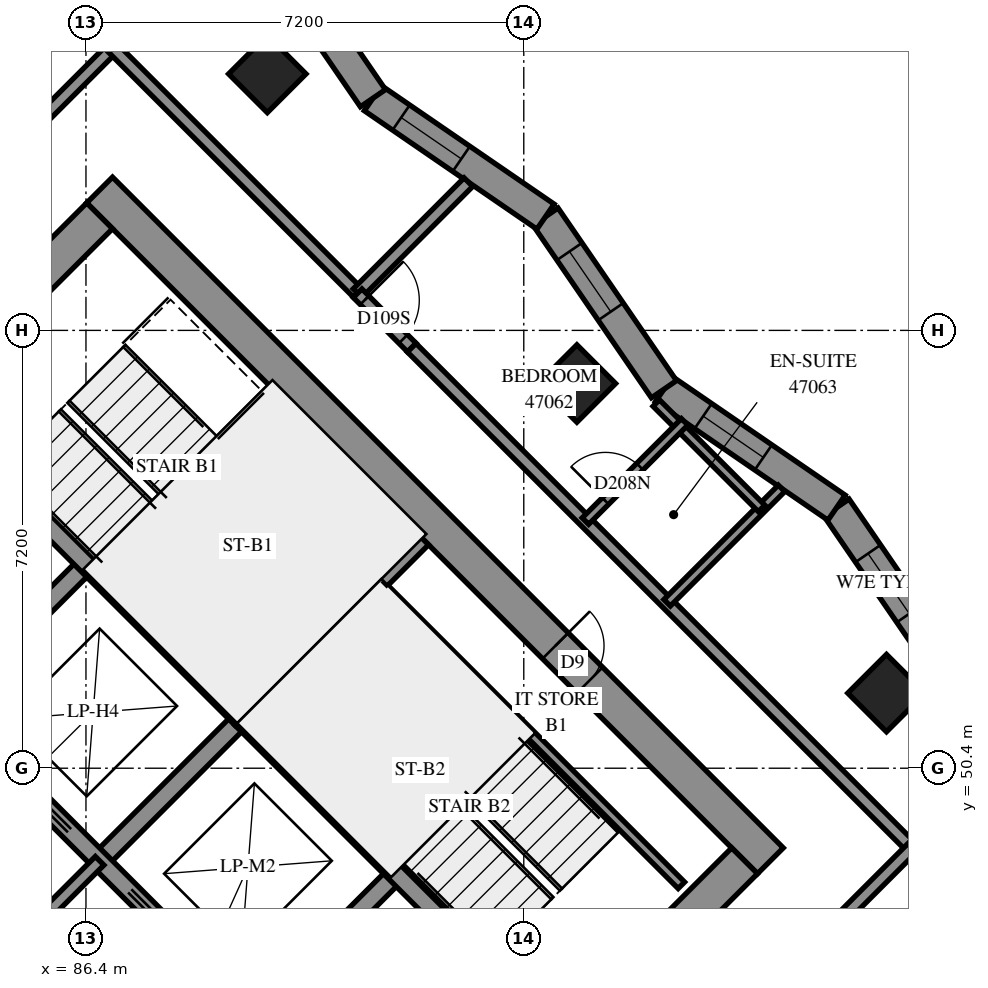
"""IFC4 building model, lengths in metres.
Left out: names, types, materials, properties, quantities, classifications, styles, units other than length and angle.
Written with IfcOpenShell. Run it as: python <this file> out.ifc"""

import sys

from ifc_helpers import new_model, si_unit, direction, frame, frame_2d, origin, origin_2d, place, context, subcontext, project, spatial, polyline, rectangle, outline, extrude, element, fill, save


model = new_model("IFC4")
c1 = context("Model", 3, precision=1e-05, world=origin(), true_north=direction((0.0, 1.0)))
c2 = subcontext(c1, "Body", "Model", "MODEL_VIEW")
j1 = project(units=[si_unit("LENGTHUNIT", "METRE"), si_unit("PLANEANGLEUNIT", "RADIAN")], contexts=[c1])
p1 = place(None, origin())
s1 = spatial("IfcSite", under=j1, at=p1, CompositionType="ELEMENT")
p2 = place(p1, origin())
s2 = spatial("IfcBuilding", under=s1, at=p2, CompositionType="ELEMENT")
p3 = place(p2, frame((0.0, 0.0, 172.8)))
s3 = spatial("IfcBuildingStorey", under=s2, at=p3, CompositionType="ELEMENT", Elevation=172.8)
for number, where, z_axis, x_axis in (
    (1, (89.382, 61.818, 0.0), (0.0, 0.0, 1.0), (0.707, -0.707, 0.0)),
    (2, (94.474, 56.727, 0.0), (0.0, 0.0, 1.0), (0.707, -0.707, 0.0)),
    (3, (99.565, 51.635, 0.0), (0.0, 0.0, 1.0), (0.707, -0.707, 0.0)),
):
    element("IfcColumn", number, at=place(p3, frame(where, z_axis=z_axis, x_axis=x_axis)), inside=s3, PredefinedType="COLUMN", context=c2, shape_type="SweptSolid", body=[
        extrude(rectangle(XDim=0.9, YDim=0.9, at=origin_2d()), origin(), (0.0, 0.0, 1.0), 3.1),
    ])
p4 = place(p3, frame((76.018, 49.302, -0.3), z_axis=(0.0, 0.0, 1.0), x_axis=(0.7071067812, -0.7071067812, 0.0)))
e4 = element("IfcWall", 4, at=p4, inside=s3, PredefinedType="SHEAR", context=c2, shape_type="SweptSolid", body=[
    extrude(rectangle(XDim=15.6, YDim=0.6, at=frame_2d((7.8, 0.0))), origin(), (0.0, 0.0, 1.0), 2.7),
])
p5 = place(p3, frame((86.625, 59.908, -0.3), z_axis=(0.0, 0.0, 1.0), x_axis=(0.7071067812, -0.7071067812, 0.0)))
e5 = element("IfcWall", 5, at=p5, inside=s3, PredefinedType="SHEAR", context=c2, shape_type="SweptSolid", body=[
    extrude(rectangle(XDim=15.6, YDim=0.6, at=frame_2d((7.8, 0.0))), origin(), (0.0, 0.0, 1.0), 2.7),
])
p6 = place(p5, frame((10.6, 0.0, 0.3)))
e6 = element("IfcOpeningElement", 6, at=p6, cuts=e5, PredefinedType="OPENING", context=c2, shape_type="SweptSolid", body=[
    extrude(rectangle(XDim=0.8, YDim=2.1, at=frame_2d((0.4, 1.05))), frame((0.0, 0.31, 0.0), z_axis=(0.0, -1.0, 0.0), x_axis=(1.0, 0.0, 0.0)), (0.0, 0.0, 1.0), 0.62),
])
p7 = place(p3, frame((76.442, 49.302, -0.3), z_axis=(0.0, 0.0, 1.0), x_axis=(0.7071067812, 0.7071067812, 0.0)))
e7 = element("IfcWall", 7, at=p7, inside=s3, PredefinedType="SHEAR", context=c2, shape_type="SweptSolid", body=[
    extrude(rectangle(XDim=14.4, YDim=0.6, at=frame_2d((7.2, 0.0))), origin(), (0.0, 0.0, 1.0), 2.7),
])
p8 = place(p7, frame((4.55, 0.0, 0.3)))
e8 = element("IfcOpeningElement", 8, at=p8, cuts=e7, PredefinedType="OPENING", context=c2, shape_type="SweptSolid", body=[
    extrude(rectangle(XDim=1.1, YDim=2.1, at=frame_2d((0.55, 1.05))), frame((0.0, 0.31, 0.0), z_axis=(0.0, -1.0, 0.0), x_axis=(1.0, 0.0, 0.0)), (0.0, 0.0, 1.0), 0.62),
])
p9 = place(p7, frame((11.35, 0.0, 0.3)))
e9 = element("IfcOpeningElement", 9, at=p9, cuts=e7, PredefinedType="OPENING", context=c2, shape_type="SweptSolid", body=[
    extrude(rectangle(XDim=1.1, YDim=2.1, at=frame_2d((0.55, 1.05))), frame((0.0, 0.31, 0.0), z_axis=(0.0, -1.0, 0.0), x_axis=(1.0, 0.0, 0.0)), (0.0, 0.0, 1.0), 0.62),
])
p10 = place(p3, frame((87.049, 38.695, -0.3), z_axis=(0.0, 0.0, 1.0), x_axis=(0.7071067812, 0.7071067812, 0.0)))
e10 = element("IfcWall", 10, at=p10, inside=s3, PredefinedType="SHEAR", context=c2, shape_type="SweptSolid", body=[
    extrude(rectangle(XDim=14.4, YDim=0.6, at=frame_2d((7.2, 0.0))), origin(), (0.0, 0.0, 1.0), 2.7),
])
p11 = place(p10, frame((4.55, 0.0, 0.3)))
e11 = element("IfcOpeningElement", 11, at=p11, cuts=e10, PredefinedType="OPENING", context=c2, shape_type="SweptSolid", body=[
    extrude(rectangle(XDim=1.1, YDim=2.1, at=frame_2d((0.55, 1.05))), frame((0.0, 0.31, 0.0), z_axis=(0.0, -1.0, 0.0), x_axis=(1.0, 0.0, 0.0)), (0.0, 0.0, 1.0), 0.62),
])
p12 = place(p10, frame((11.35, 0.0, 0.3)))
e12 = element("IfcOpeningElement", 12, at=p12, cuts=e10, PredefinedType="OPENING", context=c2, shape_type="SweptSolid", body=[
    extrude(rectangle(XDim=1.1, YDim=2.1, at=frame_2d((0.55, 1.05))), frame((0.0, 0.31, 0.0), z_axis=(0.0, -1.0, 0.0), x_axis=(1.0, 0.0, 0.0)), (0.0, 0.0, 1.0), 0.62),
])
p13 = place(p3, frame((84.079, 51.423, 0.0), z_axis=(0.0, 0.0, 1.0), x_axis=(0.7071219326, 0.7070916295, 0.0)))
e13 = element("IfcWall", 13, at=p13, inside=s3, PredefinedType="SOLIDWALL", context=c2, shape_type="SweptSolid", body=[
    extrude(rectangle(XDim=3.3, YDim=0.3, at=frame_2d((1.65, 0.0))), origin(), (0.0, 0.0, 1.0), 3.1),
])
for number, where, z_axis, x_axis in (
    (14, (86.625, 48.878, 0.0), (0.0, 0.0, 1.0), (0.707, 0.707, 0.0)),
    (15, (89.17, 46.332, 0.0), (0.0, 0.0, 1.0), (0.707, 0.707, 0.0)),
):
    element("IfcWall", number, at=place(p3, frame(where, z_axis=z_axis, x_axis=x_axis)), inside=s3, PredefinedType="SOLIDWALL", context=c2, shape_type="SweptSolid", body=[
        extrude(rectangle(XDim=3.3, YDim=0.3, at=frame_2d((1.65, 0.0))), origin(), (0.0, 0.0, 1.0), 3.1),
    ])
p14 = place(p3, frame((78.988, 51.423, 0.0), z_axis=(0.0, 0.0, 1.0), x_axis=(0.7071067812, -0.7071067812, 0.0)))
e16 = element("IfcWall", 16, at=p14, inside=s3, PredefinedType="SOLIDWALL", context=c2, shape_type="SweptSolid", body=[
    extrude(rectangle(XDim=14.4, YDim=0.3, at=frame_2d((7.2, 0.0))), origin(), (0.0, 0.0, 1.0), 3.1),
])
p15 = place(p14, frame((1.35, 0.0, 0.0)))
e17 = element("IfcOpeningElement", 17, at=p15, cuts=e16, PredefinedType="OPENING", context=c2, shape_type="SweptSolid", body=[
    extrude(rectangle(XDim=0.9, YDim=2.1, at=frame_2d((0.45, 1.05))), frame((0.0, 0.16, 0.0), z_axis=(0.0, -1.0, 0.0), x_axis=(1.0, 0.0, 0.0)), (0.0, 0.0, 1.0), 0.32),
])
p16 = place(p14, frame((4.95, 0.0, 0.0)))
e18 = element("IfcOpeningElement", 18, at=p16, cuts=e16, PredefinedType="OPENING", context=c2, shape_type="SweptSolid", body=[
    extrude(rectangle(XDim=0.9, YDim=2.1, at=frame_2d((0.45, 1.05))), frame((0.0, 0.16, 0.0), z_axis=(0.0, -1.0, 0.0), x_axis=(1.0, 0.0, 0.0)), (0.0, 0.0, 1.0), 0.32),
])
p17 = place(p14, frame((8.55, 0.0, 0.0)))
e19 = element("IfcOpeningElement", 19, at=p17, cuts=e16, PredefinedType="OPENING", context=c2, shape_type="SweptSolid", body=[
    extrude(rectangle(XDim=0.9, YDim=2.1, at=frame_2d((0.45, 1.05))), frame((0.0, 0.16, 0.0), z_axis=(0.0, -1.0, 0.0), x_axis=(1.0, 0.0, 0.0)), (0.0, 0.0, 1.0), 0.32),
])
p18 = place(p14, frame((12.05, 0.0, 0.0)))
e20 = element("IfcOpeningElement", 20, at=p18, cuts=e16, PredefinedType="OPENING", context=c2, shape_type="SweptSolid", body=[
    extrude(rectangle(XDim=1.1, YDim=2.1, at=frame_2d((0.55, 1.05))), frame((0.0, 0.16, 0.0), z_axis=(0.0, -1.0, 0.0), x_axis=(1.0, 0.0, 0.0)), (0.0, 0.0, 1.0), 0.32),
])
p19 = place(p3, frame((81.534, 53.969, 0.0), z_axis=(0.0, 0.0, 1.0), x_axis=(0.707103309, -0.7071102534, 0.0)))
e21 = element("IfcWall", 21, at=p19, inside=s3, PredefinedType="SOLIDWALL", context=c2, shape_type="SweptSolid", body=[
    extrude(rectangle(XDim=14.4, YDim=0.3, at=frame_2d((7.2, 0.0))), origin(), (0.0, 0.0, 1.0), 3.1),
])
p20 = place(p19, frame((1.25, 0.0, 0.0)))
e22 = element("IfcOpeningElement", 22, at=p20, cuts=e21, PredefinedType="OPENING", context=c2, shape_type="SweptSolid", body=[
    extrude(rectangle(XDim=1.1, YDim=2.1, at=frame_2d((0.55, 1.05))), frame((0.0, 0.16, 0.0), z_axis=(0.0, -1.0, 0.0), x_axis=(1.0, 0.0, 0.0)), (0.0, 0.0, 1.0), 0.32),
])
p21 = place(p19, frame((4.85, 0.0, 0.0)))
e23 = element("IfcOpeningElement", 23, at=p21, cuts=e21, PredefinedType="OPENING", context=c2, shape_type="SweptSolid", body=[
    extrude(rectangle(XDim=1.1, YDim=2.1, at=frame_2d((0.55, 1.05))), frame((0.0, 0.16, 0.0), z_axis=(0.0, -1.0, 0.0), x_axis=(1.0, 0.0, 0.0)), (0.0, 0.0, 1.0), 0.32),
])
p22 = place(p19, frame((8.45, 0.0, 0.0)))
e24 = element("IfcOpeningElement", 24, at=p22, cuts=e21, PredefinedType="OPENING", context=c2, shape_type="SweptSolid", body=[
    extrude(rectangle(XDim=1.1, YDim=2.1, at=frame_2d((0.55, 1.05))), frame((0.0, 0.16, 0.0), z_axis=(0.0, -1.0, 0.0), x_axis=(1.0, 0.0, 0.0)), (0.0, 0.0, 1.0), 0.32),
])
p23 = place(p19, frame((12.05, 0.0, 0.0)))
e25 = element("IfcOpeningElement", 25, at=p23, cuts=e21, PredefinedType="OPENING", context=c2, shape_type="SweptSolid", body=[
    extrude(rectangle(XDim=1.1, YDim=2.1, at=frame_2d((0.55, 1.05))), frame((0.0, 0.16, 0.0), z_axis=(0.0, -1.0, 0.0), x_axis=(1.0, 0.0, 0.0)), (0.0, 0.0, 1.0), 0.32),
])
for number, where, z_axis, x_axis in (
    (26, (83.867, 56.302, 0.0), (0.0, 0.0, 1.0), (0.707, -0.707, 0.0)),
    (27, (88.958, 51.211, 0.0), (0.0, 0.0, 1.0), (0.707, -0.707, 0.0)),
):
    element("IfcWall", number, at=place(p3, frame(where, z_axis=z_axis, x_axis=x_axis)), inside=s3, PredefinedType="SOLIDWALL", context=c2, shape_type="SweptSolid", body=[
        extrude(rectangle(XDim=7.2, YDim=0.3, at=frame_2d((3.6, 0.0))), origin(), (0.0, 0.0, 1.0), 3.1),
    ])
p24 = place(p3, frame((88.958, 51.211, 0.0), z_axis=(0.0, 0.0, 1.0), x_axis=(0.7071067812, 0.7071067812, 0.0)))
e28 = element("IfcWall", 28, at=p24, inside=s3, PredefinedType="SOLIDWALL", context=c2, shape_type="SweptSolid", body=[
    extrude(rectangle(XDim=4.2, YDim=0.3, at=frame_2d((2.1, 0.0))), origin(), (0.0, 0.0, 1.0), 3.1),
])
p25 = place(p3, frame((100.691, 51.846, 0.0), z_axis=(0.0, 0.0, 1.0), x_axis=(-0.5657654369, 0.8245662316, 0.0)))
e29 = element("IfcWall", 29, at=p25, inside=s3, PredefinedType="SOLIDWALL", context=c2, shape_type="SweptSolid", body=[
    extrude(outline(polyline([(0.046, -0.25), (3.489, -0.25), (3.396, 0.25), (-0.046, 0.25), (0.046, -0.25)])), origin(), (0.0, 0.0, 1.0), 3.1),
])
p26 = place(p25, frame((1.327, 0.0, 0.45)))
e30 = element("IfcOpeningElement", 30, at=p26, cuts=e29, PredefinedType="OPENING", context=c2, shape_type="SweptSolid", body=[
    extrude(rectangle(XDim=1.2, YDim=2.5, at=frame_2d((0.6, 1.25))), frame((0.0, 0.26, 0.0), z_axis=(0.0, -1.0, 0.0), x_axis=(1.0, 0.0, 0.0)), (0.0, 0.0, 1.0), 0.52),
])
p27 = place(p3, frame((98.744, 54.685, 0.0), z_axis=(0.0, 0.0, 1.0), x_axis=(-0.8245797835, 0.5657456855, 0.0)))
e31 = element("IfcWall", 31, at=p27, inside=s3, PredefinedType="SOLIDWALL", context=c2, shape_type="SweptSolid", body=[
    extrude(outline(polyline([(-0.046, -0.25), (3.396, -0.25), (3.489, 0.25), (0.046, 0.25), (-0.046, -0.25)])), origin(), (0.0, 0.0, 1.0), 3.1),
])
p28 = place(p27, frame((1.46, 0.0, 0.45)))
e32 = element("IfcOpeningElement", 32, at=p28, cuts=e31, PredefinedType="OPENING", context=c2, shape_type="SweptSolid", body=[
    extrude(rectangle(XDim=1.2, YDim=2.5, at=frame_2d((0.6, 1.25))), frame((0.0, 0.26, 0.0), z_axis=(0.0, -1.0, 0.0), x_axis=(1.0, 0.0, 0.0)), (0.0, 0.0, 1.0), 0.52),
])
p29 = place(p3, frame((95.905, 56.632, 0.0), z_axis=(0.0, 0.0, 1.0), x_axis=(-0.5657456855, 0.8245797835, 0.0)))
e33 = element("IfcWall", 33, at=p29, inside=s3, PredefinedType="SOLIDWALL", context=c2, shape_type="SweptSolid", body=[
    extrude(outline(polyline([(0.046, -0.25), (3.489, -0.25), (3.396, 0.25), (-0.046, 0.25), (0.046, -0.25)])), origin(), (0.0, 0.0, 1.0), 3.1),
])
p30 = place(p29, frame((1.547, 0.0, 0.45)))
e34 = element("IfcOpeningElement", 34, at=p30, cuts=e33, PredefinedType="OPENING", context=c2, shape_type="SweptSolid", body=[
    extrude(rectangle(XDim=1.2, YDim=2.5, at=frame_2d((0.6, 1.25))), frame((0.0, 0.26, 0.0), z_axis=(0.0, -1.0, 0.0), x_axis=(1.0, 0.0, 0.0)), (0.0, 0.0, 1.0), 0.52),
])
p31 = place(p3, frame((93.958, 59.471, 0.0), z_axis=(0.0, 0.0, 1.0), x_axis=(-0.8245662316, 0.5657654369, 0.0)))
e35 = element("IfcWall", 35, at=p31, inside=s3, PredefinedType="SOLIDWALL", context=c2, shape_type="SweptSolid", body=[
    extrude(outline(polyline([(-0.046, -0.25), (3.396, -0.25), (3.489, 0.25), (0.046, 0.25), (-0.046, -0.25)])), origin(), (0.0, 0.0, 1.0), 3.1),
])
p32 = place(p31, frame((1.68, 0.0, 0.45)))
e36 = element("IfcOpeningElement", 36, at=p32, cuts=e35, PredefinedType="OPENING", context=c2, shape_type="SweptSolid", body=[
    extrude(rectangle(XDim=1.2, YDim=2.5, at=frame_2d((0.6, 1.25))), frame((0.0, 0.26, 0.0), z_axis=(0.0, -1.0, 0.0), x_axis=(1.0, 0.0, 0.0)), (0.0, 0.0, 1.0), 0.52),
])
p33 = place(p3, frame((91.119, 61.418, 0.0), z_axis=(0.0, 0.0, 1.0), x_axis=(-0.5657456855, 0.8245797835, 0.0)))
e37 = element("IfcWall", 37, at=p33, inside=s3, PredefinedType="SOLIDWALL", context=c2, shape_type="SweptSolid", body=[
    extrude(outline(polyline([(0.046, -0.25), (3.489, -0.25), (3.396, 0.25), (-0.046, 0.25), (0.046, -0.25)])), origin(), (0.0, 0.0, 1.0), 3.1),
])
p34 = place(p33, frame((1.766, 0.0, 0.45)))
e38 = element("IfcOpeningElement", 38, at=p34, cuts=e37, PredefinedType="OPENING", context=c2, shape_type="SweptSolid", body=[
    extrude(rectangle(XDim=1.2, YDim=2.5, at=frame_2d((0.6, 1.25))), frame((0.0, 0.26, 0.0), z_axis=(0.0, -1.0, 0.0), x_axis=(1.0, 0.0, 0.0)), (0.0, 0.0, 1.0), 0.52),
])
p35 = place(p3, frame((91.313, 53.354, 0.0), z_axis=(0.0, 0.0, 1.0), x_axis=(0.7071140275, -0.7070995348, 0.0)))
e39 = element("IfcWall", 39, at=p35, inside=s3, PredefinedType="PARTITIONING", context=c2, shape_type="SweptSolid", body=[
    extrude(rectangle(XDim=6.9, YDim=0.15, at=frame_2d((3.45, 0.0))), origin(), (0.0, 0.0, 1.0), 3.1),
])
p36 = place(p3, frame((84.079, 46.332, 0.0), z_axis=(0.0, 0.0, 1.0), x_axis=(0.7071067812, 0.7071067812, 0.0)))
e40 = element("IfcWall", 40, at=p36, inside=s3, PredefinedType="PARTITIONING", context=c2, shape_type="SweptSolid", body=[
    extrude(rectangle(XDim=3.6, YDim=0.2, at=frame_2d((1.8, 0.0))), origin(), (0.0, 0.0, 1.0), 3.1),
])
p37 = place(p3, frame((94.366, 41.348, 0.0), z_axis=(0.0, 0.0, 1.0), x_axis=(0.7071108825, 0.7071026798, 0.0)))
e41 = element("IfcWall", 41, at=p37, inside=s3, PredefinedType="PARTITIONING", context=c2, shape_type="SweptSolid", body=[
    extrude(rectangle(XDim=12.191, YDim=0.2, at=frame_2d((6.096, 0.0))), origin(), (0.0, 0.0, 1.0), 3.1),
])
p38 = place(p3, frame((91.755, 57.317, 0.0), z_axis=(0.0, 0.0, 1.0), x_axis=(0.7071067812, -0.7071067812, 0.0)))
e42 = element("IfcWall", 42, at=p38, inside=s3, PredefinedType="PARTITIONING", context=c2, shape_type="SweptSolid", body=[
    extrude(rectangle(XDim=11.639, YDim=0.2, at=frame_2d((5.819, 0.0))), origin(), (0.0, 0.0, 1.0), 3.1),
])
p39 = place(p3, frame((80.154, 55.56, 0.0), z_axis=(0.0, 0.0, 1.0), x_axis=(0.7071067812, 0.7071067812, 0.0)))
e43 = element("IfcWall", 43, at=p39, inside=s3, PredefinedType="PARTITIONING", context=c2, shape_type="SweptSolid", body=[
    extrude(rectangle(XDim=9.45, YDim=0.2, at=frame_2d((4.725, 0.0))), origin(), (0.0, 0.0, 1.0), 3.1),
])
p40 = place(p39, frame((0.292, 0.0, 0.0)))
e44 = element("IfcOpeningElement", 44, at=p40, cuts=e43, PredefinedType="OPENING", context=c2, shape_type="SweptSolid", body=[
    extrude(rectangle(XDim=1.0, YDim=2.1, at=frame_2d((0.5, 1.05))), frame((0.0, 0.11, 0.0), z_axis=(0.0, -1.0, 0.0), x_axis=(1.0, 0.0, 0.0)), (0.0, 0.0, 1.0), 0.22),
])
p41 = place(p3, frame((93.306, 42.408, 0.0), z_axis=(0.0, 0.0, 1.0), x_axis=(0.7071067812, 0.7071067812, 0.0)))
e45 = element("IfcWall", 45, at=p41, inside=s3, PredefinedType="PARTITIONING", context=c2, shape_type="SweptSolid", body=[
    extrude(rectangle(XDim=9.45, YDim=0.2, at=frame_2d((4.725, 0.0))), origin(), (0.0, 0.0, 1.0), 3.1),
])
p42 = place(p41, frame((0.253, 0.0, 0.0)))
e46 = element("IfcOpeningElement", 46, at=p42, cuts=e45, PredefinedType="OPENING", context=c2, shape_type="SweptSolid", body=[
    extrude(rectangle(XDim=1.0, YDim=2.1, at=frame_2d((0.5, 1.05))), frame((0.0, 0.11, 0.0), z_axis=(0.0, -1.0, 0.0), x_axis=(1.0, 0.0, 0.0)), (0.0, 0.0, 1.0), 0.22),
])
p43 = place(p3, frame((86.841, 62.245, 0.0), z_axis=(0.0, 0.0, 1.0), x_axis=(0.7071067812, -0.7071067812, 0.0)))
e47 = element("IfcWall", 47, at=p43, inside=s3, PredefinedType="PARTITIONING", context=c2, shape_type="SweptSolid", body=[
    extrude(rectangle(XDim=5.699, YDim=0.2, at=frame_2d((2.85, 0.0))), origin(), (0.0, 0.0, 1.0), 3.1),
])
p44 = place(p3, frame((95.957, 53.121, 0.0), z_axis=(0.0, 0.0, 1.0), x_axis=(0.7070879914, 0.7071255705, 0.0)))
e48 = element("IfcWall", 48, at=p44, inside=s3, PredefinedType="PARTITIONING", context=c2, shape_type="SweptSolid", body=[
    extrude(rectangle(XDim=2.661, YDim=0.15, at=frame_2d((1.331, 0.0))), origin(), (0.0, 0.0, 1.0), 3.1),
])
p45 = place(p3, frame((90.867, 58.213, 0.0), z_axis=(0.0, 0.0, 1.0), x_axis=(0.7066219104, 0.7075913198, 0.0)))
e49 = element("IfcWall", 49, at=p45, inside=s3, PredefinedType="PARTITIONING", context=c2, shape_type="SweptSolid", body=[
    extrude(rectangle(XDim=2.579, YDim=0.2, at=frame_2d((1.289, 0.0))), origin(), (0.0, 0.0, 1.0), 3.1),
])
p46 = place(p3, frame((95.779, 56.405, 0.0), z_axis=(0.0, 0.0, 1.0), x_axis=(0.7071067812, -0.7071067812, 0.0)))
e50 = element("IfcWall", 50, at=p46, inside=s3, PredefinedType="PARTITIONING", context=c2, shape_type="SweptSolid", body=[
    extrude(rectangle(XDim=2.449, YDim=0.15, at=frame_2d((1.225, 0.0))), origin(), (0.0, 0.0, 1.0), 3.1),
])
p47 = place(p3, frame((94.614, 54.464, 0.0), z_axis=(0.0, 0.0, 1.0), x_axis=(0.7070851111, 0.7071284506, 0.0)))
e51 = element("IfcWall", 51, at=p47, inside=s3, PredefinedType="PARTITIONING", context=c2, shape_type="SweptSolid", body=[
    extrude(rectangle(XDim=2.307, YDim=0.15, at=frame_2d((1.154, 0.0))), origin(), (0.0, 0.0, 1.0), 3.1),
])
p48 = place(p47, frame((0.466, 0.0, 0.0)))
e52 = element("IfcOpeningElement", 52, at=p48, cuts=e51, PredefinedType="OPENING", context=c2, shape_type="SweptSolid", body=[
    extrude(rectangle(XDim=0.8, YDim=2.1, at=frame_2d((0.4, 1.05))), frame((0.0, 0.085, 0.0), z_axis=(0.0, -1.0, 0.0), x_axis=(1.0, 0.0, 0.0)), (0.0, 0.0, 1.0), 0.17),
])
p49 = place(p3, frame((90.867, 58.211, 0.0), z_axis=(0.0, 0.0, 1.0), x_axis=(0.706312726, -0.7078999456, 0.0)))
e53 = element("IfcWall", 53, at=p49, inside=s3, PredefinedType="PARTITIONING", context=c2, shape_type="SweptSolid", body=[
    extrude(rectangle(XDim=1.26, YDim=0.2, at=frame_2d((0.63, 0.0))), origin(), (0.0, 0.0, 1.0), 3.1),
])
p50 = place(p49, frame((0.162, 0.0, 0.0)))
e54 = element("IfcOpeningElement", 54, at=p50, cuts=e53, PredefinedType="OPENING", context=c2, shape_type="SweptSolid", body=[
    extrude(rectangle(XDim=0.9, YDim=2.1, at=frame_2d((0.45, 1.05))), frame((0.0, 0.11, 0.0), z_axis=(0.0, -1.0, 0.0), x_axis=(1.0, 0.0, 0.0)), (0.0, 0.0, 1.0), 0.22),
])
p51 = place(p26, origin())
e55 = element("IfcWindow", 55, at=p51, inside=s3, PartitioningType="SINGLE_PANEL", PredefinedType="WINDOW", context=c2, shape_type="SweptSolid", body=[
    extrude(rectangle(XDim=1.2, YDim=2.5, at=frame_2d((0.6, 1.25))), frame((0.0, 0.18, 0.0), z_axis=(0.0, -1.0, 0.0), x_axis=(1.0, 0.0, 0.0)), (0.0, 0.0, 1.0), 0.06),
])
fill(e30, e55)
p52 = place(p28, origin())
e56 = element("IfcWindow", 56, at=p52, inside=s3, PartitioningType="SINGLE_PANEL", PredefinedType="WINDOW", context=c2, shape_type="SweptSolid", body=[
    extrude(rectangle(XDim=1.2, YDim=2.5, at=frame_2d((0.6, 1.25))), frame((0.0, 0.18, 0.0), z_axis=(0.0, -1.0, 0.0), x_axis=(1.0, 0.0, 0.0)), (0.0, 0.0, 1.0), 0.06),
])
fill(e32, e56)
p53 = place(p30, origin())
e57 = element("IfcWindow", 57, at=p53, inside=s3, PartitioningType="SINGLE_PANEL", PredefinedType="WINDOW", context=c2, shape_type="SweptSolid", body=[
    extrude(rectangle(XDim=1.2, YDim=2.5, at=frame_2d((0.6, 1.25))), frame((0.0, 0.18, 0.0), z_axis=(0.0, -1.0, 0.0), x_axis=(1.0, 0.0, 0.0)), (0.0, 0.0, 1.0), 0.06),
])
fill(e34, e57)
p54 = place(p32, origin())
e58 = element("IfcWindow", 58, at=p54, inside=s3, PartitioningType="SINGLE_PANEL", PredefinedType="WINDOW", context=c2, shape_type="SweptSolid", body=[
    extrude(rectangle(XDim=1.2, YDim=2.5, at=frame_2d((0.6, 1.25))), frame((0.0, 0.18, 0.0), z_axis=(0.0, -1.0, 0.0), x_axis=(1.0, 0.0, 0.0)), (0.0, 0.0, 1.0), 0.06),
])
fill(e36, e58)
p55 = place(p6, origin())
e59 = element("IfcDoor", 59, at=p55, inside=s3, OperationType="SINGLE_SWING_RIGHT", PredefinedType="DOOR", context=c2, shape_type="SweptSolid", body=[
    extrude(rectangle(XDim=0.8, YDim=2.1, at=frame_2d((0.4, 1.05))), frame((0.0, 0.025, 0.0), z_axis=(0.0, -1.0, 0.0), x_axis=(1.0, 0.0, 0.0)), (0.0, 0.0, 1.0), 0.05),
])
fill(e6, e59)
p56 = place(p50, origin())
e60 = element("IfcDoor", 60, at=p56, inside=s3, OperationType="SINGLE_SWING_RIGHT", PredefinedType="DOOR", context=c2, shape_type="SweptSolid", body=[
    extrude(rectangle(XDim=0.9, YDim=2.1, at=frame_2d((0.45, 1.05))), frame((0.0, 0.025, 0.0), z_axis=(0.0, -1.0, 0.0), x_axis=(1.0, 0.0, 0.0)), (0.0, 0.0, 1.0), 0.05),
])
fill(e54, e60)
p57 = place(p48, origin())
e61 = element("IfcDoor", 61, at=p57, inside=s3, OperationType="SINGLE_SWING_RIGHT", PredefinedType="DOOR", context=c2, shape_type="SweptSolid", body=[
    extrude(rectangle(XDim=0.8, YDim=2.1, at=frame_2d((0.4, 1.05))), frame((0.0, 0.025, 0.0), z_axis=(0.0, -1.0, 0.0), x_axis=(1.0, 0.0, 0.0)), (0.0, 0.0, 1.0), 0.05),
])
fill(e52, e61)
save(model, sys.argv[1])
